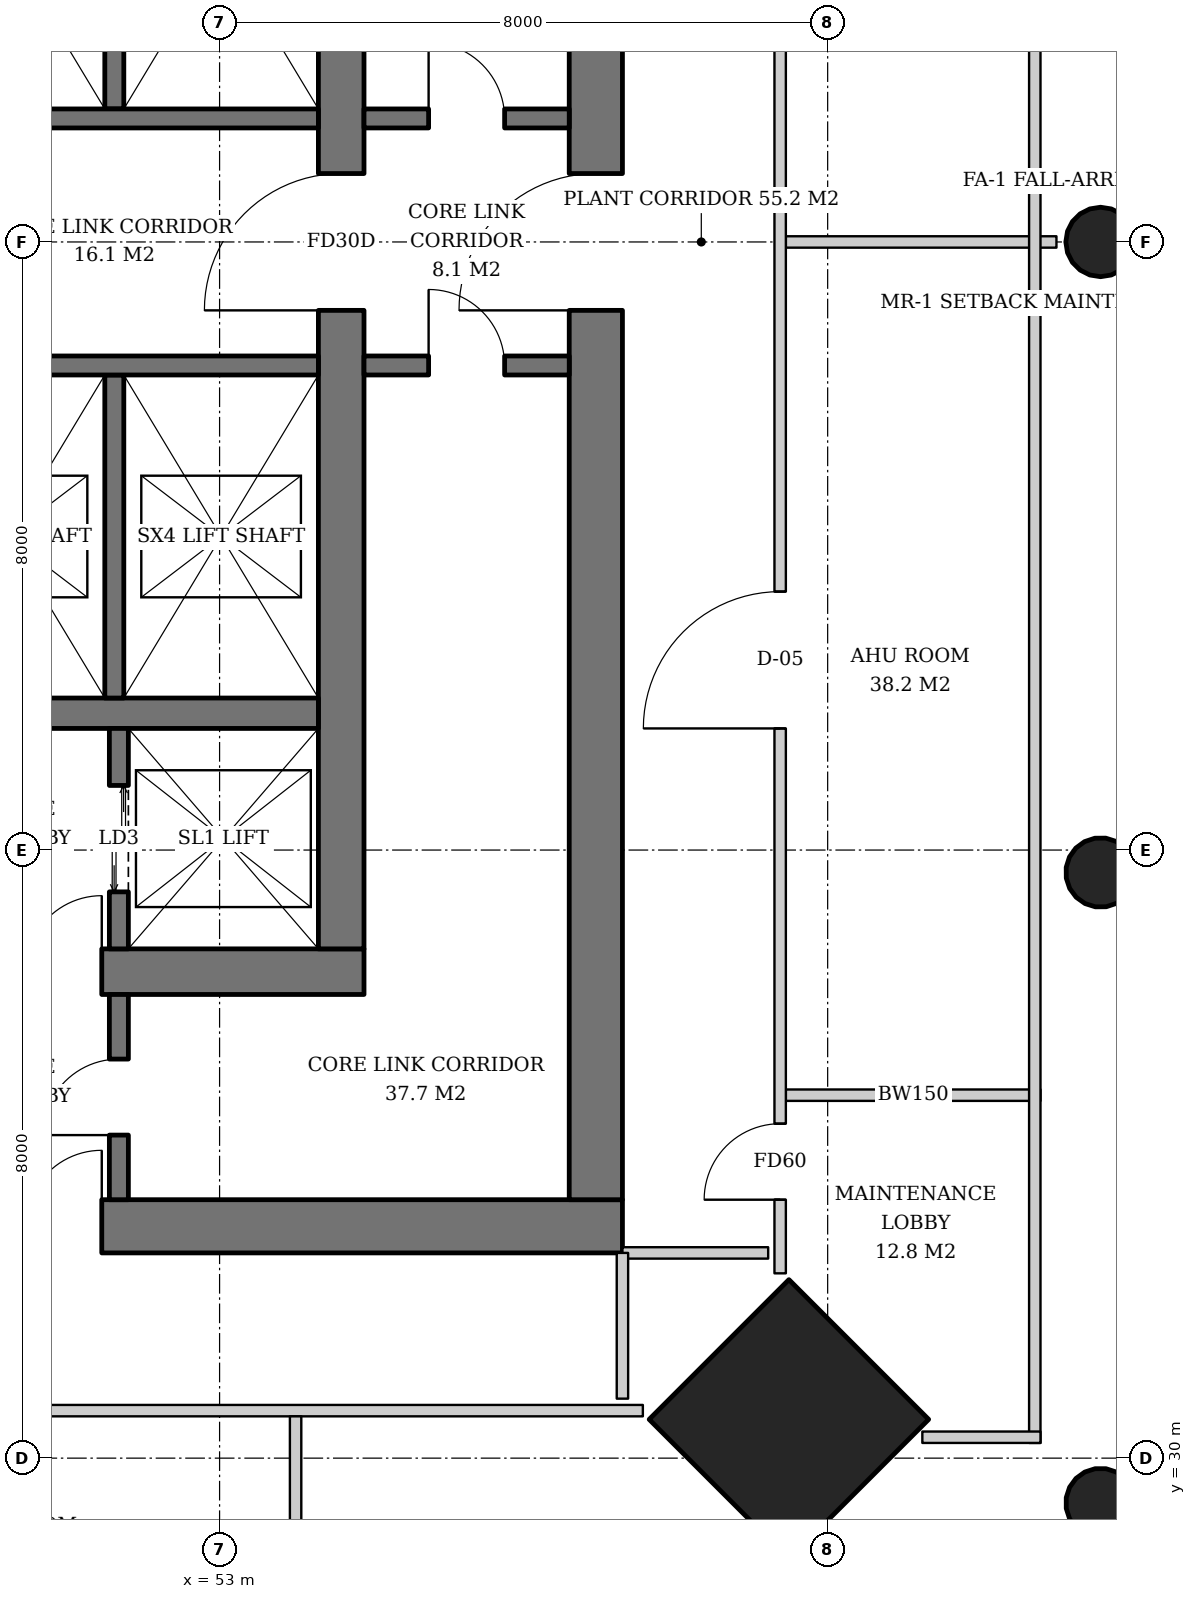
"""IFC4 building model, lengths in metres.
Left out: names, types, materials, properties, quantities, classifications, styles, units other than length and angle.
Written with IfcOpenShell. Run it as: python <this file> out.ifc"""

import sys

from ifc_helpers import new_model, si_unit, direction, frame, frame_2d, origin, origin_2d, place, context, subcontext, project, spatial, rectangle, hollow_circle, extrude, element, fill, save


model = new_model("IFC4")
c1 = context("Model", 3, precision=1e-05, world=origin(), true_north=direction((0.0, 1.0)))
c2 = subcontext(c1, "Body", "Model", "MODEL_VIEW")
j1 = project(units=[si_unit("LENGTHUNIT", "METRE"), si_unit("PLANEANGLEUNIT", "RADIAN")], contexts=[c1])
p1 = place(None, origin())
s1 = spatial("IfcSite", under=j1, at=p1, CompositionType="ELEMENT")
p2 = place(p1, origin())
s2 = spatial("IfcBuilding", under=s1, at=p2, CompositionType="ELEMENT")
p3 = place(p2, frame((0.0, 0.0, 157.8)))
s3 = spatial("IfcBuildingStorey", under=s2, at=p3, CompositionType="ELEMENT", Elevation=157.8)
p4 = place(p3, frame((64.629, 29.371, 0.0), z_axis=(-0.031962158256, 0.031962158256, 0.998977898093), x_axis=(-0.707106781187, -0.707106781187, 0.0)))
e1 = element("IfcColumn", 1, at=p4, inside=s3, PredefinedType="COLUMN", context=c2, shape_type="SweptSolid", body=[
    extrude(hollow_circle(Radius=0.457, WallThickness=0.03, at=origin_2d()), origin(), (0.0, 0.0, 1.0), 3.804),
])
p5 = place(p3, frame((64.629, 37.686, 0.0), z_axis=(-0.031974442509, 0.015923015547, 0.999361842679), x_axis=(-0.445775033553, -0.895145027055, 0.0)))
e2 = element("IfcColumn", 2, at=p5, inside=s3, PredefinedType="COLUMN", context=c2, shape_type="SweptSolid", body=[
    extrude(hollow_circle(Radius=0.457, WallThickness=0.03, at=origin_2d()), origin(), (0.0, 0.0, 1.0), 3.802),
])
p6 = place(p3, frame((64.629, 46.0, 0.0), z_axis=(-0.031978496719, 0.0, 0.999488557087), x_axis=(0.0, -1.0, 0.0)))
e3 = element("IfcColumn", 3, at=p6, inside=s3, PredefinedType="COLUMN", context=c2, shape_type="SweptSolid", body=[
    extrude(hollow_circle(Radius=0.457, WallThickness=0.03, at=origin_2d()), origin(), (0.0, 0.0, 1.0), 3.802),
])
p7 = place(p3, frame((60.529, 30.471, 0.0), z_axis=(-0.031898107953, 0.031898107953, 0.998981992539), x_axis=(-0.707106781187, -0.707106781187, 0.0)))
e4 = element("IfcColumn", 4, at=p7, inside=s3, PredefinedType="COLUMN", context=c2, shape_type="SweptSolid", body=[
    extrude(rectangle(XDim=2.6, YDim=2.6, at=origin_2d()), origin(), (0.0, 0.0, 1.0), 3.804),
])
p8 = place(p3, frame((35.1, 36.4, 0.0), z_axis=(0.0, 0.0, 1.0), x_axis=(1.0, 0.0, 0.0)))
e5 = element("IfcWall", 5, at=p8, inside=s3, PredefinedType="SHEAR", context=c2, shape_type="SweptSolid", body=[
    extrude(rectangle(XDim=19.8, YDim=0.6, at=frame_2d((9.9, 0.0))), origin(), (0.0, 0.0, 1.0), 3.8),
])
p9 = place(p8, frame((3.9, 0.0, 0.0)))
e6 = element("IfcOpeningElement", 6, at=p9, cuts=e5, PredefinedType="OPENING", context=c2, shape_type="SweptSolid", body=[
    extrude(rectangle(XDim=1.0, YDim=2.1, at=frame_2d((0.5, 1.05))), frame((0.0, 0.31, 0.0), z_axis=(0.0, -1.0, 0.0), x_axis=(1.0, 0.0, 0.0)), (0.0, 0.0, 1.0), 0.62),
])
p10 = place(p8, frame((15.35, 0.0, 0.0)))
e7 = element("IfcOpeningElement", 7, at=p10, cuts=e5, PredefinedType="OPENING", context=c2, shape_type="SweptSolid", body=[
    extrude(rectangle(XDim=1.0, YDim=2.1, at=frame_2d((0.5, 1.05))), frame((0.0, 0.31, 0.0), z_axis=(0.0, -1.0, 0.0), x_axis=(1.0, 0.0, 0.0)), (0.0, 0.0, 1.0), 0.62),
])
p11 = place(p3, frame((54.6, 36.7, 0.0), z_axis=(0.0, 0.0, 1.0), x_axis=(0.0, 1.0, 0.0)))
e8 = element("IfcWall", 8, at=p11, inside=s3, PredefinedType="SHEAR", context=c2, shape_type="SweptSolid", body=[
    extrude(rectangle(XDim=18.6, YDim=0.6, at=frame_2d((9.3, 0.0))), origin(), (0.0, 0.0, 1.0), 3.8),
])
p12 = place(p11, frame((8.4, 0.0, 0.0)))
e9 = element("IfcOpeningElement", 9, at=p12, cuts=e8, PredefinedType="OPENING", context=c2, shape_type="SweptSolid", body=[
    extrude(rectangle(XDim=1.8, YDim=2.4, at=frame_2d((0.9, 1.2))), frame((0.0, 0.31, 0.0), z_axis=(0.0, -1.0, 0.0), x_axis=(1.0, 0.0, 0.0)), (0.0, 0.0, 1.0), 0.62),
])
p13 = place(p3, frame((31.7, 33.05, 0.0), z_axis=(0.0, 0.0, 1.0), x_axis=(1.0, 0.0, 0.0)))
e10 = element("IfcWall", 10, at=p13, inside=s3, PredefinedType="SHEAR", context=c2, shape_type="SweptSolid", body=[
    extrude(rectangle(XDim=26.6, YDim=0.7, at=frame_2d((13.3, 0.0))), origin(), (0.0, 0.0, 1.0), 3.8),
])
p14 = place(p13, frame((7.3, 0.0, 0.0)))
e11 = element("IfcOpeningElement", 11, at=p14, cuts=e10, PredefinedType="OPENING", context=c2, shape_type="SweptSolid", body=[
    extrude(rectangle(XDim=1.0, YDim=2.1, at=frame_2d((0.5, 1.05))), frame((0.0, 0.36, 0.0), z_axis=(0.0, -1.0, 0.0), x_axis=(1.0, 0.0, 0.0)), (0.0, 0.0, 1.0), 0.72),
])
p15 = place(p13, frame((18.75, 0.0, 0.0)))
e12 = element("IfcOpeningElement", 12, at=p15, cuts=e10, PredefinedType="OPENING", context=c2, shape_type="SweptSolid", body=[
    extrude(rectangle(XDim=1.0, YDim=2.1, at=frame_2d((0.5, 1.05))), frame((0.0, 0.36, 0.0), z_axis=(0.0, -1.0, 0.0), x_axis=(1.0, 0.0, 0.0)), (0.0, 0.0, 1.0), 0.72),
])
p16 = place(p13, frame((1.85, 0.0, 0.0)))
e13 = element("IfcOpeningElement", 13, at=p16, cuts=e10, PredefinedType="OPENING", context=c2, shape_type="SweptSolid", body=[
    extrude(rectangle(XDim=1.0, YDim=2.1, at=frame_2d((0.5, 1.05))), frame((0.0, 0.36, 0.0), z_axis=(0.0, -1.0, 0.0), x_axis=(1.0, 0.0, 0.0)), (0.0, 0.0, 1.0), 0.72),
])
p17 = place(p13, frame((4.7, 0.0, 0.0)))
e14 = element("IfcOpeningElement", 14, at=p17, cuts=e10, PredefinedType="OPENING", context=c2, shape_type="SweptSolid", body=[
    extrude(rectangle(XDim=1.0, YDim=2.1, at=frame_2d((0.5, 1.05))), frame((0.0, 0.36, 0.0), z_axis=(0.0, -1.0, 0.0), x_axis=(1.0, 0.0, 0.0)), (0.0, 0.0, 1.0), 0.72),
])
p18 = place(p3, frame((57.95, 33.4, 0.0), z_axis=(0.0, 0.0, 1.0), x_axis=(0.0, 1.0, 0.0)))
e15 = element("IfcWall", 15, at=p18, inside=s3, PredefinedType="SHEAR", context=c2, shape_type="SweptSolid", body=[
    extrude(rectangle(XDim=25.2, YDim=0.7, at=frame_2d((12.6, 0.0))), origin(), (0.0, 0.0, 1.0), 3.8),
])
p19 = place(p18, frame((11.7, 0.0, 0.0)))
e16 = element("IfcOpeningElement", 16, at=p19, cuts=e15, PredefinedType="OPENING", context=c2, shape_type="SweptSolid", body=[
    extrude(rectangle(XDim=1.8, YDim=2.4, at=frame_2d((0.9, 1.2))), frame((0.0, 0.36, 0.0), z_axis=(0.0, -1.0, 0.0), x_axis=(1.0, 0.0, 0.0)), (0.0, 0.0, 1.0), 0.72),
])
p20 = place(p3, frame((35.7, 39.8, 0.0), z_axis=(0.0, 0.0, 1.0), x_axis=(1.0, 0.0, 0.0)))
e17 = element("IfcWall", 17, at=p20, inside=s3, PredefinedType="SHEAR", context=c2, shape_type="SweptSolid", body=[
    extrude(rectangle(XDim=18.6, YDim=0.4, at=frame_2d((9.3, 0.0))), origin(), (0.0, 0.0, 1.0), 3.8),
])
p21 = place(p3, frame((51.675, 36.7, 0.0), z_axis=(0.0, 0.0, 1.0), x_axis=(0.0, 1.0, 0.0)))
e18 = element("IfcWall", 18, at=p21, inside=s3, PredefinedType="SHEAR", context=c2, shape_type="SweptSolid", body=[
    extrude(rectangle(XDim=2.9, YDim=0.25, at=frame_2d((1.45, 0.0))), origin(), (0.0, 0.0, 1.0), 3.8),
])
p22 = place(p21, frame((0.75, 0.0, 0.0)))
e19 = element("IfcOpeningElement", 19, at=p22, cuts=e18, PredefinedType="OPENING", context=c2, shape_type="SweptSolid", body=[
    extrude(rectangle(XDim=1.4, YDim=2.4, at=frame_2d((0.7, 1.2))), frame((0.0, 0.135, 0.0), z_axis=(0.0, -1.0, 0.0), x_axis=(1.0, 0.0, 0.0)), (0.0, 0.0, 1.0), 0.27),
])
p23 = place(p3, frame((51.615, 47.75, 0.0), z_axis=(0.0, 0.0, 1.0), x_axis=(0.0, 1.0, 0.0)))
e20 = element("IfcWall", 20, at=p23, inside=s3, PredefinedType="SHEAR", context=c2, shape_type="SweptSolid", body=[
    extrude(rectangle(XDim=4.25, YDim=0.25, at=frame_2d((2.125, 0.0))), origin(), (0.0, 0.0, 1.0), 3.8),
])
p24 = place(p3, frame((48.93, 47.625, 0.0), z_axis=(0.0, 0.0, 1.0), x_axis=(1.0, 0.0, 0.0)))
e21 = element("IfcWall", 21, at=p24, inside=s3, PredefinedType="SHEAR", context=c2, shape_type="SweptSolid", body=[
    extrude(rectangle(XDim=5.37, YDim=0.25, at=frame_2d((2.685, 0.0))), origin(), (0.0, 0.0, 1.0), 3.8),
])
p25 = place(p3, frame((51.615, 44.25, 0.0), z_axis=(0.0, 0.0, 1.0), x_axis=(0.0, -1.0, 0.0)))
e22 = element("IfcWall", 22, at=p25, inside=s3, PredefinedType="SHEAR", context=c2, shape_type="SweptSolid", body=[
    extrude(rectangle(XDim=4.25, YDim=0.25, at=frame_2d((2.125, 0.0))), origin(), (0.0, 0.0, 1.0), 3.8),
])
p26 = place(p3, frame((48.93, 44.375, 0.0), z_axis=(0.0, 0.0, 1.0), x_axis=(1.0, 0.0, 0.0)))
e23 = element("IfcWall", 23, at=p26, inside=s3, PredefinedType="SHEAR", context=c2, shape_type="SweptSolid", body=[
    extrude(rectangle(XDim=5.37, YDim=0.25, at=frame_2d((2.685, 0.0))), origin(), (0.0, 0.0, 1.0), 3.8),
])
p27 = place(p3, frame((54.9, 44.375, 0.0), z_axis=(0.0, 0.0, 1.0), x_axis=(1.0, 0.0, 0.0)))
e24 = element("IfcWall", 24, at=p27, inside=s3, PredefinedType="SOLIDWALL", context=c2, shape_type="SweptSolid", body=[
    extrude(rectangle(XDim=2.7, YDim=0.25, at=frame_2d((1.35, 0.0))), origin(), (0.0, 0.0, 1.0), 3.52),
])
p28 = place(p27, frame((0.85, 0.0, 0.0)))
e25 = element("IfcOpeningElement", 25, at=p28, cuts=e24, PredefinedType="OPENING", context=c2, shape_type="SweptSolid", body=[
    extrude(rectangle(XDim=1.0, YDim=2.1, at=frame_2d((0.5, 1.05))), frame((0.0, 0.135, 0.0), z_axis=(0.0, -1.0, 0.0), x_axis=(1.0, 0.0, 0.0)), (0.0, 0.0, 1.0), 0.27),
])
p29 = place(p3, frame((54.9, 47.625, 0.0), z_axis=(0.0, 0.0, 1.0), x_axis=(1.0, 0.0, 0.0)))
e26 = element("IfcWall", 26, at=p29, inside=s3, PredefinedType="SOLIDWALL", context=c2, shape_type="SweptSolid", body=[
    extrude(rectangle(XDim=2.7, YDim=0.25, at=frame_2d((1.35, 0.0))), origin(), (0.0, 0.0, 1.0), 3.52),
])
p30 = place(p29, frame((0.85, 0.0, 0.0)))
e27 = element("IfcOpeningElement", 27, at=p30, cuts=e26, PredefinedType="OPENING", context=c2, shape_type="SweptSolid", body=[
    extrude(rectangle(XDim=1.0, YDim=2.1, at=frame_2d((0.5, 1.05))), frame((0.0, 0.135, 0.0), z_axis=(0.0, -1.0, 0.0), x_axis=(1.0, 0.0, 0.0)), (0.0, 0.0, 1.0), 0.27),
])
p31 = place(p3, frame((51.675, 33.4, 0.0), z_axis=(0.0, 0.0, 1.0), x_axis=(0.0, 1.0, 0.0)))
e28 = element("IfcWall", 28, at=p31, inside=s3, PredefinedType="SOLIDWALL", context=c2, shape_type="SweptSolid", body=[
    extrude(rectangle(XDim=2.7, YDim=0.25, at=frame_2d((1.35, 0.0))), origin(), (0.0, 0.0, 1.0), 3.52),
])
p32 = place(p31, frame((0.85, 0.0, 0.0)))
e29 = element("IfcOpeningElement", 29, at=p32, cuts=e28, PredefinedType="OPENING", context=c2, shape_type="SweptSolid", body=[
    extrude(rectangle(XDim=1.0, YDim=2.1, at=frame_2d((0.5, 1.05))), frame((0.0, 0.135, 0.0), z_axis=(0.0, -1.0, 0.0), x_axis=(1.0, 0.0, 0.0)), (0.0, 0.0, 1.0), 0.27),
])
p33 = place(p3, frame((58.3, 32.7, 0.0), z_axis=(0.0, 0.0, 1.0), x_axis=(1.0, 0.0, 0.0)))
e30 = element("IfcWall", 30, at=p33, inside=s3, PredefinedType="PARTITIONING", context=c2, shape_type="SweptSolid", body=[
    extrude(rectangle(XDim=1.917, YDim=0.15, at=frame_2d((0.958, 0.0))), origin(), (0.0, 0.0, 1.0), 3.52),
])
p34 = place(p3, frame((60.45, 34.775, 0.0), z_axis=(0.0, 0.0, 1.0), x_axis=(1.0, 0.0, 0.0)))
e31 = element("IfcWall", 31, at=p34, inside=s3, PredefinedType="SOLIDWALL", context=c2, shape_type="SweptSolid", body=[
    extrude(rectangle(XDim=3.35, YDim=0.15, at=frame_2d((1.675, 0.0))), origin(), (0.0, 0.0, 1.0), 3.52),
])
p35 = place(p3, frame((60.45, 46.0, 0.0), z_axis=(0.0, 0.0, 1.0), x_axis=(1.0, 0.0, 0.0)))
e32 = element("IfcWall", 32, at=p35, inside=s3, PredefinedType="SOLIDWALL", context=c2, shape_type="SweptSolid", body=[
    extrude(rectangle(XDim=3.56, YDim=0.15, at=frame_2d((1.78, 0.0))), origin(), (0.0, 0.0, 1.0), 3.52),
])
p36 = place(p3, frame((60.375, 32.431, 0.0), z_axis=(0.0, 0.0, 1.0), x_axis=(0.0, 1.0, 0.0)))
e33 = element("IfcWall", 33, at=p36, inside=s3, PredefinedType="SOLIDWALL", context=c2, shape_type="SweptSolid", body=[
    extrude(rectangle(XDim=27.137, YDim=0.15, at=frame_2d((13.569, 0.0))), origin(), (0.0, 0.0, 1.0), 2.706),
])
p37 = place(p36, frame((0.969, 0.0, 0.0)))
e34 = element("IfcOpeningElement", 34, at=p37, cuts=e33, PredefinedType="OPENING", context=c2, shape_type="SweptSolid", body=[
    extrude(rectangle(XDim=1.0, YDim=2.1, at=frame_2d((0.5, 1.05))), frame((0.0, 0.085, 0.0), z_axis=(0.0, -1.0, 0.0), x_axis=(1.0, 0.0, 0.0)), (0.0, 0.0, 1.0), 0.17),
])
p38 = place(p36, frame((7.169, 0.0, 0.0)))
e35 = element("IfcOpeningElement", 35, at=p38, cuts=e33, PredefinedType="OPENING", context=c2, shape_type="SweptSolid", body=[
    extrude(rectangle(XDim=1.8, YDim=2.4, at=frame_2d((0.9, 1.2))), frame((0.0, 0.085, 0.0), z_axis=(0.0, -1.0, 0.0), x_axis=(1.0, 0.0, 0.0)), (0.0, 0.0, 1.0), 0.17),
])
p39 = place(p36, frame((17.169, 0.0, 0.0)))
e36 = element("IfcOpeningElement", 36, at=p39, cuts=e33, PredefinedType="OPENING", context=c2, shape_type="SweptSolid", body=[
    extrude(rectangle(XDim=1.8, YDim=2.4, at=frame_2d((0.9, 1.2))), frame((0.0, 0.085, 0.0), z_axis=(0.0, -1.0, 0.0), x_axis=(1.0, 0.0, 0.0)), (0.0, 0.0, 1.0), 0.17),
])
p40 = place(p3, frame((58.3, 32.7, 0.0), z_axis=(0.0, 0.0, 1.0), x_axis=(0.0, -1.0, 0.0)))
e37 = element("IfcWall", 37, at=p40, inside=s3, PredefinedType="PARTITIONING", context=c2, shape_type="SweptSolid", body=[
    extrude(rectangle(XDim=1.917, YDim=0.15, at=frame_2d((0.958, 0.0))), origin(), (0.0, 0.0, 1.0), 3.52),
])
p41 = place(p3, frame((31.431, 30.625, 0.0), z_axis=(0.0, 0.0, 1.0), x_axis=(1.0, 0.0, 0.0)))
e38 = element("IfcWall", 38, at=p41, inside=s3, PredefinedType="SOLIDWALL", context=c2, shape_type="SweptSolid", body=[
    extrude(rectangle(XDim=27.137, YDim=0.15, at=frame_2d((13.569, 0.0))), origin(), (0.0, 0.0, 1.0), 2.706),
])
p42 = place(p41, frame((6.131, 0.0, 0.0)))
e39 = element("IfcOpeningElement", 39, at=p42, cuts=e38, PredefinedType="OPENING", context=c2, shape_type="SweptSolid", body=[
    extrude(rectangle(XDim=1.8, YDim=2.4, at=frame_2d((0.9, 1.2))), frame((0.0, 0.085, 0.0), z_axis=(0.0, -1.0, 0.0), x_axis=(1.0, 0.0, 0.0)), (0.0, 0.0, 1.0), 0.17),
])
p43 = place(p41, frame((17.169, 0.0, 0.0)))
e40 = element("IfcOpeningElement", 40, at=p43, cuts=e38, PredefinedType="OPENING", context=c2, shape_type="SweptSolid", body=[
    extrude(rectangle(XDim=1.8, YDim=2.4, at=frame_2d((0.9, 1.2))), frame((0.0, 0.085, 0.0), z_axis=(0.0, -1.0, 0.0), x_axis=(1.0, 0.0, 0.0)), (0.0, 0.0, 1.0), 0.17),
])
p44 = place(p3, frame((54.0, 30.55, 0.0), z_axis=(0.0, 0.0, 1.0), x_axis=(0.0, -1.0, 0.0)))
e41 = element("IfcWall", 41, at=p44, inside=s3, PredefinedType="SOLIDWALL", context=c2, shape_type="SweptSolid", body=[
    extrude(rectangle(XDim=3.35, YDim=0.15, at=frame_2d((1.675, 0.0))), origin(), (0.0, 0.0, 1.0), 3.52),
])
p45 = place(p3, frame((63.725, 61.8, 0.0), z_axis=(0.0, 0.0, 1.0), x_axis=(0.0, -1.0, 0.0)))
e42 = element("IfcWall", 42, at=p45, inside=s3, PredefinedType="PARTITIONING", context=c2, shape_type="SweptSolid", body=[
    extrude(rectangle(XDim=31.6, YDim=0.15, at=frame_2d((15.8, 0.0))), origin(), (0.0, 0.0, 1.0), 2.706),
])
p46 = place(p3, frame((63.8, 30.275, 0.0), z_axis=(0.0, 0.0, 1.0), x_axis=(-1.0, 0.0, 0.0)))
e43 = element("IfcWall", 43, at=p46, inside=s3, PredefinedType="PARTITIONING", context=c2, shape_type="SweptSolid", body=[
    extrude(rectangle(XDim=1.554, YDim=0.15, at=frame_2d((0.777, 0.0))), origin(), (0.0, 0.0, 1.0), 2.92),
])
p47 = place(p22, origin())
e44 = element("IfcDoor", 44, at=p47, inside=s3, OperationType="DOUBLE_DOOR_SLIDING", PredefinedType="DOOR", context=c2, shape_type="SweptSolid", body=[
    extrude(rectangle(XDim=1.4, YDim=2.4, at=frame_2d((0.7, 1.2))), frame((0.0, 0.025, 0.0), z_axis=(0.0, -1.0, 0.0), x_axis=(1.0, 0.0, 0.0)), (0.0, 0.0, 1.0), 0.05),
])
fill(e19, e44)
p48 = place(p28, origin())
e45 = element("IfcDoor", 45, at=p48, inside=s3, OperationType="SINGLE_SWING_LEFT", PredefinedType="DOOR", context=c2, shape_type="SweptSolid", body=[
    extrude(rectangle(XDim=1.0, YDim=2.1, at=frame_2d((0.5, 1.05))), frame((0.0, 0.025, 0.0), z_axis=(0.0, -1.0, 0.0), x_axis=(1.0, 0.0, 0.0)), (0.0, 0.0, 1.0), 0.05),
])
fill(e25, e45)
p49 = place(p30, origin())
e46 = element("IfcDoor", 46, at=p49, inside=s3, OperationType="SINGLE_SWING_LEFT", PredefinedType="DOOR", context=c2, shape_type="SweptSolid", body=[
    extrude(rectangle(XDim=1.0, YDim=2.1, at=frame_2d((0.5, 1.05))), frame((0.0, 0.025, 0.0), z_axis=(0.0, -1.0, 0.0), x_axis=(1.0, 0.0, 0.0)), (0.0, 0.0, 1.0), 0.05),
])
fill(e27, e46)
p50 = place(p32, origin())
e47 = element("IfcDoor", 47, at=p50, inside=s3, OperationType="SINGLE_SWING_LEFT", PredefinedType="DOOR", context=c2, shape_type="SweptSolid", body=[
    extrude(rectangle(XDim=1.0, YDim=2.1, at=frame_2d((0.5, 1.05))), frame((0.0, 0.025, 0.0), z_axis=(0.0, -1.0, 0.0), x_axis=(1.0, 0.0, 0.0)), (0.0, 0.0, 1.0), 0.05),
])
fill(e29, e47)
p51 = place(p12, origin())
e48 = element("IfcDoor", 48, at=p51, inside=s3, OperationType="DOUBLE_DOOR_SINGLE_SWING", PredefinedType="DOOR", context=c2, shape_type="SweptSolid", body=[
    extrude(rectangle(XDim=1.8, YDim=2.4, at=frame_2d((0.9, 1.2))), frame((0.0, 0.025, 0.0), z_axis=(0.0, -1.0, 0.0), x_axis=(1.0, 0.0, 0.0)), (0.0, 0.0, 1.0), 0.05),
])
fill(e9, e48)
p52 = place(p10, origin())
e49 = element("IfcDoor", 49, at=p52, inside=s3, OperationType="SINGLE_SWING_RIGHT", PredefinedType="DOOR", context=c2, shape_type="SweptSolid", body=[
    extrude(rectangle(XDim=1.0, YDim=2.1, at=frame_2d((0.5, 1.05))), frame((0.0, 0.025, 0.0), z_axis=(0.0, -1.0, 0.0), x_axis=(1.0, 0.0, 0.0)), (0.0, 0.0, 1.0), 0.05),
])
fill(e7, e49)
p53 = place(p19, origin())
e50 = element("IfcDoor", 50, at=p53, inside=s3, OperationType="DOUBLE_DOOR_SINGLE_SWING", PredefinedType="DOOR", context=c2, shape_type="SweptSolid", body=[
    extrude(rectangle(XDim=1.8, YDim=2.4, at=frame_2d((0.9, 1.2))), frame((0.0, 0.025, 0.0), z_axis=(0.0, -1.0, 0.0), x_axis=(1.0, 0.0, 0.0)), (0.0, 0.0, 1.0), 0.05),
])
fill(e16, e50)
p54 = place(p15, origin())
e51 = element("IfcDoor", 51, at=p54, inside=s3, OperationType="SINGLE_SWING_RIGHT", PredefinedType="DOOR", context=c2, shape_type="SweptSolid", body=[
    extrude(rectangle(XDim=1.0, YDim=2.1, at=frame_2d((0.5, 1.05))), frame((0.0, 0.025, 0.0), z_axis=(0.0, -1.0, 0.0), x_axis=(1.0, 0.0, 0.0)), (0.0, 0.0, 1.0), 0.05),
])
fill(e12, e51)
p55 = place(p37, origin())
e52 = element("IfcDoor", 52, at=p55, inside=s3, OperationType="SINGLE_SWING_LEFT", PredefinedType="DOOR", context=c2, shape_type="SweptSolid", body=[
    extrude(rectangle(XDim=1.0, YDim=2.1, at=frame_2d((0.5, 1.05))), frame((0.0, 0.025, 0.0), z_axis=(0.0, -1.0, 0.0), x_axis=(1.0, 0.0, 0.0)), (0.0, 0.0, 1.0), 0.05),
])
fill(e34, e52)
p56 = place(p38, origin())
e53 = element("IfcDoor", 53, at=p56, inside=s3, OperationType="DOUBLE_DOOR_SINGLE_SWING", PredefinedType="DOOR", context=c2, shape_type="SweptSolid", body=[
    extrude(rectangle(XDim=1.8, YDim=2.4, at=frame_2d((0.9, 1.2))), frame((0.0, 0.025, 0.0), z_axis=(0.0, -1.0, 0.0), x_axis=(1.0, 0.0, 0.0)), (0.0, 0.0, 1.0), 0.05),
])
fill(e35, e53)
save(model, sys.argv[1])
